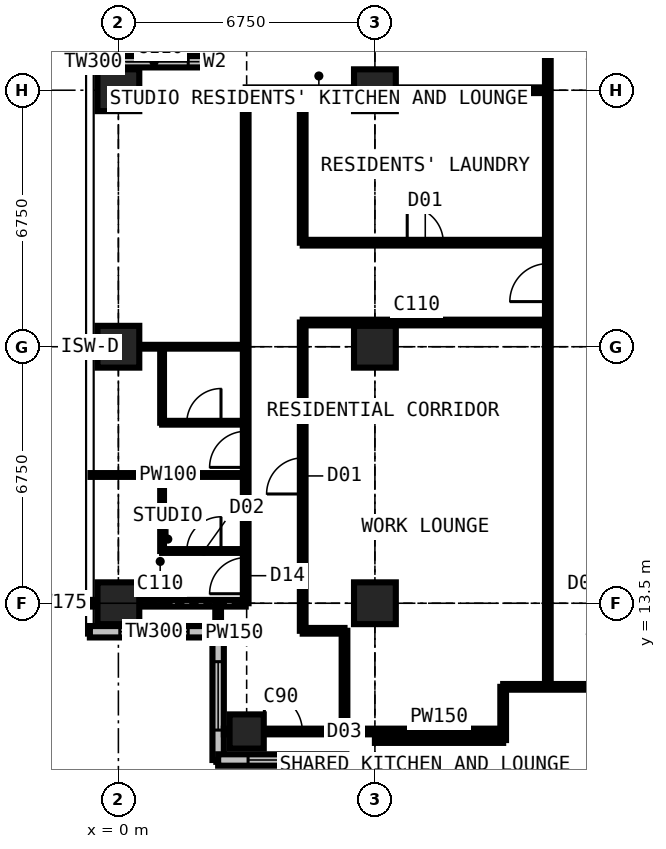
"""IFC4 building model, lengths in metres.
Left out: names, types, materials, properties, quantities, classifications, styles, units other than length and angle.
Written with IfcOpenShell. Run it as: python <this file> out.ifc"""

import sys

from ifc_helpers import new_model, si_unit, direction, frame, frame_2d, origin, origin_2d, place, context, subcontext, project, spatial, rectangle, extrude, element, fill, save


model = new_model("IFC4")
c1 = context("Model", 3, precision=1e-05, world=origin(), true_north=direction((0.0, 1.0)))
c2 = subcontext(c1, "Body", "Model", "MODEL_VIEW")
j1 = project(units=[si_unit("LENGTHUNIT", "METRE"), si_unit("PLANEANGLEUNIT", "RADIAN")], contexts=[c1])
p1 = place(None, origin())
s1 = spatial("IfcSite", under=j1, at=p1, CompositionType="ELEMENT")
p2 = place(p1, origin())
s2 = spatial("IfcBuilding", under=s1, at=p2, CompositionType="ELEMENT")
p3 = place(p2, frame((0.0, 0.0, 225.9)))
s3 = spatial("IfcBuildingStorey", under=s2, at=p3, CompositionType="ELEMENT", Elevation=225.9)
for number, where, z_axis, x_axis in (
    (1, (0.0, 13.5, 0.0), (0.0, 0.0, 1.0), (1.0, 0.0, 0.0)),
    (2, (0.0, 20.25, 0.0), (0.0, 0.0, 1.0), (1.0, 0.0, 0.0)),
    (3, (0.0, 27.0, 0.0), (0.0, 0.0, 1.0), (1.0, 0.0, 0.0)),
):
    element("IfcColumn", number, at=place(p3, frame(where, z_axis=z_axis, x_axis=x_axis)), inside=s3, PredefinedType="COLUMN", context=c2, shape_type="SweptSolid", body=[
        extrude(rectangle(XDim=1.1, YDim=1.1, at=origin_2d()), origin(), (0.0, 0.0, 1.0), 3.6),
    ])
p4 = place(p3, frame((3.375, 10.125, 0.0), z_axis=(0.0, 0.0, 1.0), x_axis=(1.0, 0.0, 0.0)))
e4 = element("IfcColumn", 4, at=p4, inside=s3, PredefinedType="COLUMN", context=c2, shape_type="SweptSolid", body=[
    extrude(rectangle(XDim=0.9, YDim=0.9, at=origin_2d()), origin(), (0.0, 0.0, 1.0), 3.6),
])
for number, where, z_axis, x_axis in (
    (5, (6.75, 13.5, 0.0), (0.0, 0.0, 1.0), (1.0, 0.0, 0.0)),
    (6, (6.75, 20.25, 0.0), (0.0, 0.0, 1.0), (1.0, 0.0, 0.0)),
    (7, (6.75, 27.0, 0.0), (0.0, 0.0, 1.0), (1.0, 0.0, 0.0)),
):
    element("IfcColumn", number, at=place(p3, frame(where, z_axis=z_axis, x_axis=x_axis)), inside=s3, PredefinedType="COLUMN", context=c2, shape_type="SweptSolid", body=[
        extrude(rectangle(XDim=1.1, YDim=1.1, at=origin_2d()), origin(), (0.0, 0.0, 1.0), 3.6),
    ])
p5 = place(p3, frame((2.625, 31.125, 0.0), z_axis=(0.0, 0.0, 1.0), x_axis=(0.0, -1.0, 0.0)))
e8 = element("IfcWall", 8, at=p5, inside=s3, PredefinedType="SOLIDWALL", context=c2, shape_type="SweptSolid", body=[
    extrude(rectangle(XDim=3.375, YDim=0.3, at=frame_2d((1.688, 0.0))), origin(), (0.0, 0.0, 1.0), 3.375),
])
p6 = place(p5, frame((0.788, 0.0, 0.6)))
e9 = element("IfcOpeningElement", 9, at=p6, cuts=e8, PredefinedType="OPENING", context=c2, shape_type="SweptSolid", body=[
    extrude(rectangle(XDim=1.8, YDim=2.1, at=frame_2d((0.9, 1.05))), frame((0.0, 0.16, 0.0), z_axis=(0.0, -1.0, 0.0), x_axis=(1.0, 0.0, 0.0)), (0.0, 0.0, 1.0), 0.32),
])
p7 = place(p3, frame((2.625, 27.75, 0.0), z_axis=(0.0, 0.0, 1.0), x_axis=(-1.0, 0.0, 0.0)))
e10 = element("IfcWall", 10, at=p7, inside=s3, PredefinedType="SOLIDWALL", context=c2, shape_type="SweptSolid", body=[
    extrude(rectangle(XDim=3.375, YDim=0.3, at=frame_2d((1.688, 0.0))), origin(), (0.0, 0.0, 1.0), 3.375),
])
p8 = place(p7, frame((0.788, 0.0, 0.6)))
e11 = element("IfcOpeningElement", 11, at=p8, cuts=e10, PredefinedType="OPENING", context=c2, shape_type="SweptSolid", body=[
    extrude(rectangle(XDim=1.8, YDim=2.1, at=frame_2d((0.9, 1.05))), frame((0.0, 0.16, 0.0), z_axis=(0.0, -1.0, 0.0), x_axis=(1.0, 0.0, 0.0)), (0.0, 0.0, 1.0), 0.32),
])
p9 = place(p3, frame((-0.75, 12.75, 0.0), z_axis=(0.0, 0.0, 1.0), x_axis=(1.0, 0.0, 0.0)))
e12 = element("IfcWall", 12, at=p9, inside=s3, PredefinedType="SOLIDWALL", context=c2, shape_type="SweptSolid", body=[
    extrude(rectangle(XDim=3.375, YDim=0.3, at=frame_2d((1.688, 0.0))), origin(), (0.0, 0.0, 1.0), 3.375),
])
p10 = place(p9, frame((0.788, 0.0, 0.6)))
e13 = element("IfcOpeningElement", 13, at=p10, cuts=e12, PredefinedType="OPENING", context=c2, shape_type="SweptSolid", body=[
    extrude(rectangle(XDim=1.8, YDim=2.1, at=frame_2d((0.9, 1.05))), frame((0.0, 0.16, 0.0), z_axis=(0.0, -1.0, 0.0), x_axis=(1.0, 0.0, 0.0)), (0.0, 0.0, 1.0), 0.32),
])
p11 = place(p3, frame((2.625, 12.75, 0.0), z_axis=(0.0, 0.0, 1.0), x_axis=(0.0, -1.0, 0.0)))
e14 = element("IfcWall", 14, at=p11, inside=s3, PredefinedType="SOLIDWALL", context=c2, shape_type="SweptSolid", body=[
    extrude(rectangle(XDim=3.375, YDim=0.3, at=frame_2d((1.688, 0.0))), origin(), (0.0, 0.0, 1.0), 3.375),
])
p12 = place(p11, frame((0.788, 0.0, 0.6)))
e15 = element("IfcOpeningElement", 15, at=p12, cuts=e14, PredefinedType="OPENING", context=c2, shape_type="SweptSolid", body=[
    extrude(rectangle(XDim=1.8, YDim=2.1, at=frame_2d((0.9, 1.05))), frame((0.0, 0.16, 0.0), z_axis=(0.0, -1.0, 0.0), x_axis=(1.0, 0.0, 0.0)), (0.0, 0.0, 1.0), 0.32),
])
p13 = place(p3, frame((2.625, 9.375, 0.0), z_axis=(0.0, 0.0, 1.0), x_axis=(1.0, 0.0, 0.0)))
e16 = element("IfcWall", 16, at=p13, inside=s3, PredefinedType="SOLIDWALL", context=c2, shape_type="SweptSolid", body=[
    extrude(rectangle(XDim=3.375, YDim=0.3, at=frame_2d((1.688, 0.0))), origin(), (0.0, 0.0, 1.0), 3.375),
])
p14 = place(p13, frame((0.788, 0.0, 0.6)))
e17 = element("IfcOpeningElement", 17, at=p14, cuts=e16, PredefinedType="OPENING", context=c2, shape_type="SweptSolid", body=[
    extrude(rectangle(XDim=1.8, YDim=2.1, at=frame_2d((0.9, 1.05))), frame((0.0, 0.16, 0.0), z_axis=(0.0, -1.0, 0.0), x_axis=(1.0, 0.0, 0.0)), (0.0, 0.0, 1.0), 0.32),
])
p15 = place(p3, frame((6.0, 9.375, 0.0), z_axis=(0.0, 0.0, 1.0), x_axis=(0.0, -1.0, 0.0)))
e18 = element("IfcWall", 18, at=p15, inside=s3, PredefinedType="SOLIDWALL", context=c2, shape_type="SweptSolid", body=[
    extrude(rectangle(XDim=3.375, YDim=0.3, at=frame_2d((1.688, 0.0))), origin(), (0.0, 0.0, 1.0), 3.375),
])
p16 = place(p15, frame((0.788, 0.0, 0.6)))
e19 = element("IfcOpeningElement", 19, at=p16, cuts=e18, PredefinedType="OPENING", context=c2, shape_type="SweptSolid", body=[
    extrude(rectangle(XDim=1.8, YDim=2.1, at=frame_2d((0.9, 1.05))), frame((0.0, 0.16, 0.0), z_axis=(0.0, -1.0, 0.0), x_axis=(1.0, 0.0, 0.0)), (0.0, 0.0, 1.0), 0.32),
])
p17 = place(p3, frame((-0.734, 13.5, 0.0), z_axis=(0.0, 0.0, 1.0), x_axis=(1.0, 0.0, 0.0)))
e20 = element("IfcWall", 20, at=p17, inside=s3, PredefinedType="PARTITIONING", context=c2, shape_type="SweptSolid", body=[
    extrude(rectangle(XDim=4.084, YDim=0.175, at=frame_2d((2.042, 0.0))), origin(), (0.0, 0.0, 1.0), 2.877),
])
p18 = place(p3, frame((-0.734, 16.875, 0.0), z_axis=(0.0, 0.0, 1.0), x_axis=(1.0, 0.0, 0.0)))
e21 = element("IfcWall", 21, at=p18, inside=s3, PredefinedType="PARTITIONING", context=c2, shape_type="SweptSolid", body=[
    extrude(rectangle(XDim=4.084, YDim=0.1, at=frame_2d((2.042, 0.0))), origin(), (0.0, 0.0, 1.0), 3.375),
])
p19 = place(p3, frame((-0.734, 20.25, 0.0), z_axis=(0.0, 0.0, 1.0), x_axis=(1.0, 0.0, 0.0)))
e22 = element("IfcWall", 22, at=p19, inside=s3, PredefinedType="PARTITIONING", context=c2, shape_type="SweptSolid", body=[
    extrude(rectangle(XDim=4.084, YDim=0.1, at=frame_2d((2.042, 0.0))), origin(), (0.0, 0.0, 1.0), 2.877),
])
p20 = place(p3, frame((1.15, 14.875, 0.0), z_axis=(0.0, 0.0, 1.0), x_axis=(0.0, 1.0, 0.0)))
e23 = element("IfcWall", 23, at=p20, inside=s3, PredefinedType="PARTITIONING", context=c2, shape_type="SweptSolid", body=[
    extrude(rectangle(XDim=2.0, YDim=0.1, at=frame_2d((1.0, 0.0))), origin(), (0.0, 0.0, 1.0), 3.375),
])
p21 = place(p3, frame((1.15, 14.875, 0.0), z_axis=(0.0, 0.0, 1.0), x_axis=(1.0, 0.0, 0.0)))
e24 = element("IfcWall", 24, at=p21, inside=s3, PredefinedType="PARTITIONING", context=c2, shape_type="SweptSolid", body=[
    extrude(rectangle(XDim=2.2, YDim=0.1, at=frame_2d((1.1, 0.0))), origin(), (0.0, 0.0, 1.0), 3.375),
])
p22 = place(p21, frame((0.65, 0.0, 0.0)))
e25 = element("IfcOpeningElement", 25, at=p22, cuts=e24, PredefinedType="OPENING", context=c2, shape_type="SweptSolid", body=[
    extrude(rectangle(XDim=0.9, YDim=2.2, at=frame_2d((0.45, 1.1))), frame((0.0, 0.06, 0.0), z_axis=(0.0, -1.0, 0.0), x_axis=(1.0, 0.0, 0.0)), (0.0, 0.0, 1.0), 0.12),
])
p23 = place(p3, frame((1.15, 18.25, 0.0), z_axis=(0.0, 0.0, 1.0), x_axis=(0.0, 1.0, 0.0)))
e26 = element("IfcWall", 26, at=p23, inside=s3, PredefinedType="PARTITIONING", context=c2, shape_type="SweptSolid", body=[
    extrude(rectangle(XDim=2.0, YDim=0.1, at=frame_2d((1.0, 0.0))), origin(), (0.0, 0.0, 1.0), 3.375),
])
p24 = place(p3, frame((1.15, 18.25, 0.0), z_axis=(0.0, 0.0, 1.0), x_axis=(1.0, 0.0, 0.0)))
e27 = element("IfcWall", 27, at=p24, inside=s3, PredefinedType="PARTITIONING", context=c2, shape_type="SweptSolid", body=[
    extrude(rectangle(XDim=2.2, YDim=0.1, at=frame_2d((1.1, 0.0))), origin(), (0.0, 0.0, 1.0), 3.375),
])
p25 = place(p24, frame((0.65, 0.0, 0.0)))
e28 = element("IfcOpeningElement", 28, at=p25, cuts=e27, PredefinedType="OPENING", context=c2, shape_type="SweptSolid", body=[
    extrude(rectangle(XDim=0.9, YDim=2.2, at=frame_2d((0.45, 1.1))), frame((0.0, 0.06, 0.0), z_axis=(0.0, -1.0, 0.0), x_axis=(1.0, 0.0, 0.0)), (0.0, 0.0, 1.0), 0.12),
])
p26 = place(p3, frame((2.625, 12.766, 0.0), z_axis=(0.0, 0.0, 1.0), x_axis=(0.0, 1.0, 0.0)))
e29 = element("IfcWall", 29, at=p26, inside=s3, PredefinedType="PARTITIONING", context=c2, shape_type="SweptSolid", body=[
    extrude(rectangle(XDim=0.734, YDim=0.15, at=frame_2d((0.367, 0.0))), origin(), (0.0, 0.0, 1.0), 3.375),
])
p27 = place(p3, frame((2.775, 10.125, 0.0), z_axis=(0.0, 0.0, 1.0), x_axis=(1.0, 0.0, 0.0)))
e30 = element("IfcWall", 30, at=p27, inside=s3, PredefinedType="PARTITIONING", context=c2, shape_type="SweptSolid", body=[
    extrude(rectangle(XDim=7.35, YDim=0.15, at=frame_2d((3.675, 0.0))), origin(), (0.0, 0.0, 1.0), 2.877),
])
p28 = place(p27, frame((1.066, 0.0, 0.0)))
e31 = element("IfcOpeningElement", 31, at=p28, cuts=e30, PredefinedType="OPENING", context=c2, shape_type="SweptSolid", body=[
    extrude(rectangle(XDim=1.0, YDim=2.2, at=frame_2d((0.5, 1.1))), frame((0.0, 0.085, 0.0), z_axis=(0.0, -1.0, 0.0), x_axis=(1.0, 0.0, 0.0)), (0.0, 0.0, 1.0), 0.17),
])
p29 = place(p3, frame((3.35, 13.5, 0.0), z_axis=(0.0, 0.0, 1.0), x_axis=(0.0, 1.0, 0.0)))
e32 = element("IfcWall", 32, at=p29, inside=s3, PredefinedType="PARTITIONING", context=c2, shape_type="SweptSolid", body=[
    extrude(rectangle(XDim=13.5, YDim=0.15, at=frame_2d((6.75, 0.0))), origin(), (0.0, 0.0, 1.0), 3.375),
])
p30 = place(p29, frame((0.25, 0.0, 0.0)))
e33 = element("IfcOpeningElement", 33, at=p30, cuts=e32, PredefinedType="OPENING", context=c2, shape_type="SweptSolid", body=[
    extrude(rectangle(XDim=0.95, YDim=2.2, at=frame_2d((0.475, 1.1))), frame((0.0, 0.085, 0.0), z_axis=(0.0, -1.0, 0.0), x_axis=(1.0, 0.0, 0.0)), (0.0, 0.0, 1.0), 0.17),
])
p31 = place(p29, frame((3.575, 0.0, 0.0)))
e34 = element("IfcOpeningElement", 34, at=p31, cuts=e32, PredefinedType="OPENING", context=c2, shape_type="SweptSolid", body=[
    extrude(rectangle(XDim=0.95, YDim=2.2, at=frame_2d((0.475, 1.1))), frame((0.0, 0.085, 0.0), z_axis=(0.0, -1.0, 0.0), x_axis=(1.0, 0.0, 0.0)), (0.0, 0.0, 1.0), 0.17),
])
p32 = place(p3, frame((3.35, 27.0, 0.0), z_axis=(0.0, 0.0, 1.0), x_axis=(1.0, 0.0, 0.0)))
e35 = element("IfcWall", 35, at=p32, inside=s3, PredefinedType="PARTITIONING", context=c2, shape_type="SweptSolid", body=[
    extrude(rectangle(XDim=7.95, YDim=0.15, at=frame_2d((3.975, 0.0))), origin(), (0.0, 0.0, 1.0), 2.877),
])
p33 = place(p3, frame((4.85, 12.775, 0.0), z_axis=(0.0, 0.0, 1.0), x_axis=(0.0, 1.0, 0.0)))
e36 = element("IfcWall", 36, at=p33, inside=s3, PredefinedType="PARTITIONING", context=c2, shape_type="SweptSolid", body=[
    extrude(rectangle(XDim=8.113, YDim=0.15, at=frame_2d((4.056, 0.0))), origin(), (0.0, 0.0, 1.0), 3.375),
])
p34 = place(p33, frame((3.6, 0.0, 0.0)))
e37 = element("IfcOpeningElement", 37, at=p34, cuts=e36, PredefinedType="OPENING", context=c2, shape_type="SweptSolid", body=[
    extrude(rectangle(XDim=0.95, YDim=2.2, at=frame_2d((0.475, 1.1))), frame((0.0, 0.085, 0.0), z_axis=(0.0, -1.0, 0.0), x_axis=(1.0, 0.0, 0.0)), (0.0, 0.0, 1.0), 0.17),
])
p35 = place(p3, frame((4.85, 12.775, 0.0), z_axis=(0.0, 0.0, 1.0), x_axis=(1.0, 0.0, 0.0)))
e38 = element("IfcWall", 38, at=p35, inside=s3, PredefinedType="PARTITIONING", context=c2, shape_type="SweptSolid", body=[
    extrude(rectangle(XDim=1.1, YDim=0.15, at=frame_2d((0.55, 0.0))), origin(), (0.0, 0.0, 1.0), 3.375),
])
p36 = place(p3, frame((4.85, 20.887, 0.0), z_axis=(0.0, 0.0, 1.0), x_axis=(1.0, 0.0, 0.0)))
e39 = element("IfcWall", 39, at=p36, inside=s3, PredefinedType="PARTITIONING", context=c2, shape_type="SweptSolid", body=[
    extrude(rectangle(XDim=6.45, YDim=0.15, at=frame_2d((3.225, 0.0))), origin(), (0.0, 0.0, 1.0), 3.375),
])
p37 = place(p3, frame((4.85, 22.988, 0.0), z_axis=(0.0, 0.0, 1.0), x_axis=(0.0, 1.0, 0.0)))
e40 = element("IfcWall", 40, at=p37, inside=s3, PredefinedType="PARTITIONING", context=c2, shape_type="SweptSolid", body=[
    extrude(rectangle(XDim=4.012, YDim=0.15, at=frame_2d((2.006, 0.0))), origin(), (0.0, 0.0, 1.0), 3.375),
])
p38 = place(p3, frame((4.85, 22.988, 0.0), z_axis=(0.0, 0.0, 1.0), x_axis=(1.0, 0.0, 0.0)))
e41 = element("IfcWall", 41, at=p38, inside=s3, PredefinedType="PARTITIONING", context=c2, shape_type="SweptSolid", body=[
    extrude(rectangle(XDim=6.45, YDim=0.15, at=frame_2d((3.225, 0.0))), origin(), (0.0, 0.0, 1.0), 3.375),
])
p39 = place(p38, frame((2.75, 0.0, 0.0)))
e42 = element("IfcOpeningElement", 42, at=p39, cuts=e41, PredefinedType="OPENING", context=c2, shape_type="SweptSolid", body=[
    extrude(rectangle(XDim=0.95, YDim=2.2, at=frame_2d((0.475, 1.1))), frame((0.0, 0.085, 0.0), z_axis=(0.0, -1.0, 0.0), x_axis=(1.0, 0.0, 0.0)), (0.0, 0.0, 1.0), 0.17),
])
p40 = place(p3, frame((5.95, 10.125, 0.0), z_axis=(0.0, 0.0, 1.0), x_axis=(0.0, 1.0, 0.0)))
e43 = element("IfcWall", 43, at=p40, inside=s3, PredefinedType="PARTITIONING", context=c2, shape_type="SweptSolid", body=[
    extrude(rectangle(XDim=2.65, YDim=0.15, at=frame_2d((1.325, 0.0))), origin(), (0.0, 0.0, 1.0), 3.375),
])
p41 = place(p3, frame((6.75, 9.9, 0.0), z_axis=(0.0, 0.0, 1.0), x_axis=(1.0, 0.0, 0.0)))
e44 = element("IfcWall", 44, at=p41, inside=s3, PredefinedType="PARTITIONING", context=c2, shape_type="SweptSolid", body=[
    extrude(rectangle(XDim=3.375, YDim=0.15, at=frame_2d((1.688, 0.0))), origin(), (0.0, 0.0, 1.0), 3.375),
])
p42 = place(p3, frame((10.125, 9.9, 0.0), z_axis=(0.0, 0.0, 1.0), x_axis=(0.0, 1.0, 0.0)))
e45 = element("IfcWall", 45, at=p42, inside=s3, PredefinedType="PARTITIONING", context=c2, shape_type="SweptSolid", body=[
    extrude(rectangle(XDim=1.4, YDim=0.15, at=frame_2d((0.7, 0.0))), origin(), (0.0, 0.0, 1.0), 3.375),
])
p43 = place(p3, frame((10.125, 11.3, 0.0), z_axis=(0.0, 0.0, 1.0), x_axis=(1.0, 0.0, 0.0)))
e46 = element("IfcWall", 46, at=p43, inside=s3, PredefinedType="PARTITIONING", context=c2, shape_type="SweptSolid", body=[
    extrude(rectangle(XDim=3.375, YDim=0.15, at=frame_2d((1.688, 0.0))), origin(), (0.0, 0.0, 1.0), 3.375),
])
p44 = place(p3, frame((11.3, 11.3, 0.0), z_axis=(0.0, 0.0, 1.0), x_axis=(0.0, 1.0, 0.0)))
e47 = element("IfcWall", 47, at=p44, inside=s3, PredefinedType="PARTITIONING", context=c2, shape_type="SweptSolid", body=[
    extrude(rectangle(XDim=19.3, YDim=0.15, at=frame_2d((9.65, 0.0))), origin(), (0.0, 0.0, 1.0), 3.375),
])
p45 = place(p44, frame((18.1, 0.0, 0.0)))
e48 = element("IfcOpeningElement", 48, at=p45, cuts=e47, PredefinedType="OPENING", context=c2, shape_type="SweptSolid", body=[
    extrude(rectangle(XDim=1.0, YDim=2.2, at=frame_2d((0.5, 1.1))), frame((0.0, 0.085, 0.0), z_axis=(0.0, -1.0, 0.0), x_axis=(1.0, 0.0, 0.0)), (0.0, 0.0, 1.0), 0.17),
])
p46 = place(p44, frame((10.137, 0.0, 0.0)))
e49 = element("IfcOpeningElement", 49, at=p46, cuts=e47, PredefinedType="OPENING", context=c2, shape_type="SweptSolid", body=[
    extrude(rectangle(XDim=1.0, YDim=2.2, at=frame_2d((0.5, 1.1))), frame((0.0, 0.085, 0.0), z_axis=(0.0, -1.0, 0.0), x_axis=(1.0, 0.0, 0.0)), (0.0, 0.0, 1.0), 0.17),
])
p47 = place(p8, origin())
e50 = element("IfcWindow", 50, at=p47, inside=s3, PartitioningType="SINGLE_PANEL", PredefinedType="WINDOW", context=c2, shape_type="SweptSolid", body=[
    extrude(rectangle(XDim=1.8, YDim=2.1, at=frame_2d((0.9, 1.05))), frame((0.0, 0.03, 0.0), z_axis=(0.0, -1.0, 0.0), x_axis=(1.0, 0.0, 0.0)), (0.0, 0.0, 1.0), 0.06),
])
fill(e11, e50)
p48 = place(p10, origin())
e51 = element("IfcWindow", 51, at=p48, inside=s3, PartitioningType="SINGLE_PANEL", PredefinedType="WINDOW", context=c2, shape_type="SweptSolid", body=[
    extrude(rectangle(XDim=1.8, YDim=2.1, at=frame_2d((0.9, 1.05))), frame((0.0, 0.03, 0.0), z_axis=(0.0, -1.0, 0.0), x_axis=(1.0, 0.0, 0.0)), (0.0, 0.0, 1.0), 0.06),
])
fill(e13, e51)
p49 = place(p12, origin())
e52 = element("IfcWindow", 52, at=p49, inside=s3, PartitioningType="SINGLE_PANEL", PredefinedType="WINDOW", context=c2, shape_type="SweptSolid", body=[
    extrude(rectangle(XDim=1.8, YDim=2.1, at=frame_2d((0.9, 1.05))), frame((0.0, 0.03, 0.0), z_axis=(0.0, -1.0, 0.0), x_axis=(1.0, 0.0, 0.0)), (0.0, 0.0, 1.0), 0.06),
])
fill(e15, e52)
p50 = place(p14, origin())
e53 = element("IfcWindow", 53, at=p50, inside=s3, PartitioningType="SINGLE_PANEL", PredefinedType="WINDOW", context=c2, shape_type="SweptSolid", body=[
    extrude(rectangle(XDim=1.8, YDim=2.1, at=frame_2d((0.9, 1.05))), frame((0.0, 0.03, 0.0), z_axis=(0.0, -1.0, 0.0), x_axis=(1.0, 0.0, 0.0)), (0.0, 0.0, 1.0), 0.06),
])
fill(e17, e53)
p51 = place(p28, origin())
e54 = element("IfcDoor", 54, at=p51, inside=s3, OperationType="SINGLE_SWING_LEFT", PredefinedType="DOOR", context=c2, shape_type="SweptSolid", body=[
    extrude(rectangle(XDim=1.0, YDim=2.2, at=frame_2d((0.5, 1.1))), frame((0.0, 0.025, 0.0), z_axis=(0.0, -1.0, 0.0), x_axis=(1.0, 0.0, 0.0)), (0.0, 0.0, 1.0), 0.05),
])
fill(e31, e54)
p52 = place(p30, origin())
e55 = element("IfcDoor", 55, at=p52, inside=s3, OperationType="SINGLE_SWING_LEFT", PredefinedType="DOOR", context=c2, shape_type="SweptSolid", body=[
    extrude(rectangle(XDim=0.95, YDim=2.2, at=frame_2d((0.475, 1.1))), frame((0.0, 0.025, 0.0), z_axis=(0.0, -1.0, 0.0), x_axis=(1.0, 0.0, 0.0)), (0.0, 0.0, 1.0), 0.05),
])
fill(e33, e55)
p53 = place(p22, origin())
e56 = element("IfcDoor", 56, at=p53, inside=s3, OperationType="SINGLE_SWING_RIGHT", PredefinedType="DOOR", context=c2, shape_type="SweptSolid", body=[
    extrude(rectangle(XDim=0.9, YDim=2.2, at=frame_2d((0.45, 1.1))), frame((0.0, 0.025, 0.0), z_axis=(0.0, -1.0, 0.0), x_axis=(1.0, 0.0, 0.0)), (0.0, 0.0, 1.0), 0.05),
])
fill(e25, e56)
p54 = place(p31, origin())
e57 = element("IfcDoor", 57, at=p54, inside=s3, OperationType="SINGLE_SWING_LEFT", PredefinedType="DOOR", context=c2, shape_type="SweptSolid", body=[
    extrude(rectangle(XDim=0.95, YDim=2.2, at=frame_2d((0.475, 1.1))), frame((0.0, 0.025, 0.0), z_axis=(0.0, -1.0, 0.0), x_axis=(1.0, 0.0, 0.0)), (0.0, 0.0, 1.0), 0.05),
])
fill(e34, e57)
p55 = place(p25, origin())
e58 = element("IfcDoor", 58, at=p55, inside=s3, OperationType="SINGLE_SWING_RIGHT", PredefinedType="DOOR", context=c2, shape_type="SweptSolid", body=[
    extrude(rectangle(XDim=0.9, YDim=2.2, at=frame_2d((0.45, 1.1))), frame((0.0, 0.025, 0.0), z_axis=(0.0, -1.0, 0.0), x_axis=(1.0, 0.0, 0.0)), (0.0, 0.0, 1.0), 0.05),
])
fill(e28, e58)
p56 = place(p46, origin())
e59 = element("IfcDoor", 59, at=p56, inside=s3, OperationType="SINGLE_SWING_LEFT", PredefinedType="DOOR", context=c2, shape_type="SweptSolid", body=[
    extrude(rectangle(XDim=1.0, YDim=2.2, at=frame_2d((0.5, 1.1))), frame((0.0, 0.025, 0.0), z_axis=(0.0, -1.0, 0.0), x_axis=(1.0, 0.0, 0.0)), (0.0, 0.0, 1.0), 0.05),
])
fill(e49, e59)
p57 = place(p39, origin())
e60 = element("IfcDoor", 60, at=p57, inside=s3, OperationType="SINGLE_SWING_LEFT", PredefinedType="DOOR", context=c2, shape_type="SweptSolid", body=[
    extrude(rectangle(XDim=0.95, YDim=2.2, at=frame_2d((0.475, 1.1))), frame((0.0, 0.025, 0.0), z_axis=(0.0, -1.0, 0.0), x_axis=(1.0, 0.0, 0.0)), (0.0, 0.0, 1.0), 0.05),
])
fill(e42, e60)
p58 = place(p34, origin())
e61 = element("IfcDoor", 61, at=p58, inside=s3, OperationType="SINGLE_SWING_LEFT", PredefinedType="DOOR", context=c2, shape_type="SweptSolid", body=[
    extrude(rectangle(XDim=0.95, YDim=2.2, at=frame_2d((0.475, 1.1))), frame((0.0, 0.025, 0.0), z_axis=(0.0, -1.0, 0.0), x_axis=(1.0, 0.0, 0.0)), (0.0, 0.0, 1.0), 0.05),
])
fill(e37, e61)
save(model, sys.argv[1])
